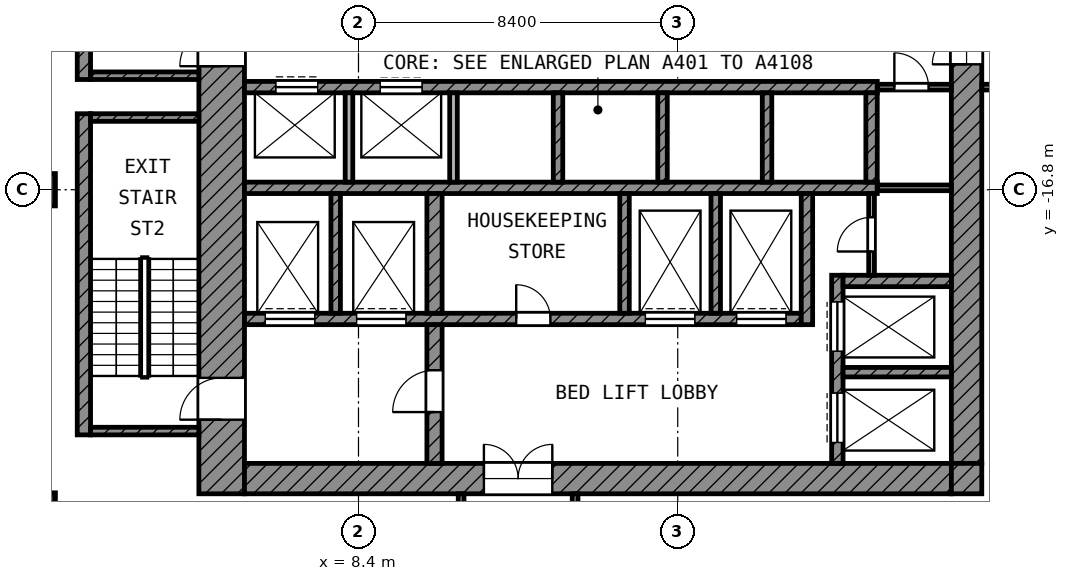
"""IFC4 building model, lengths in metres.
Left out: names, types, materials, properties, quantities, classifications, styles, units other than length and angle.
Written with IfcOpenShell. Run it as: python <this file> out.ifc"""

import sys

from ifc_helpers import new_model, si_unit, direction, frame, frame_2d, origin, origin_2d, place, context, subcontext, project, spatial, rectangle, extrude, element, fill, save


model = new_model("IFC4")
c1 = context("Model", 3, precision=1e-05, world=origin(), true_north=direction((0.0, 1.0)))
c2 = subcontext(c1, "Body", "Model", "MODEL_VIEW")
j1 = project(units=[si_unit("LENGTHUNIT", "METRE"), si_unit("PLANEANGLEUNIT", "RADIAN")], contexts=[c1])
p1 = place(None, origin())
s1 = spatial("IfcSite", under=j1, at=p1, CompositionType="ELEMENT")
p2 = place(p1, origin())
s2 = spatial("IfcBuilding", under=s1, at=p2, CompositionType="ELEMENT")
p3 = place(p2, frame((0.0, 0.0, 268.4)))
s3 = spatial("IfcBuildingStorey", under=s2, at=p3, CompositionType="ELEMENT", Elevation=268.4)
for number, where, z_axis, x_axis in (
    (1, (0.0, -16.8, 0.0), (0.0, 0.0, 1.0), (1.0, 0.0, 0.0)),
    (2, (0.0, -25.2, 0.0), (0.0, 0.0, 1.0), (1.0, 0.0, 0.0)),
):
    element("IfcColumn", number, at=place(p3, frame(where, z_axis=z_axis, x_axis=x_axis)), inside=s3, PredefinedType="COLUMN", context=c2, shape_type="SweptSolid", body=[
        extrude(rectangle(XDim=0.85, YDim=0.85, at=origin_2d()), origin(), (0.0, 0.0, 1.0), 4.2),
    ])
p4 = place(p3, frame((4.8, -24.8, 0.0), z_axis=(0.0, 0.0, 1.0), x_axis=(0.0, 1.0, 0.0)))
e3 = element("IfcWall", 3, at=p4, inside=s3, PredefinedType="SHEAR", context=c2, shape_type="SweptSolid", body=[
    extrude(rectangle(XDim=19.4, YDim=1.2, at=frame_2d((9.7, 0.0))), origin(), (0.0, 0.0, 1.0), 3.7),
])
p5 = place(p4, frame((11.25, 0.0, 0.0)))
e4 = element("IfcOpeningElement", 4, at=p5, cuts=e3, PredefinedType="OPENING", context=c2, shape_type="SweptSolid", body=[
    extrude(rectangle(XDim=1.1, YDim=2.1, at=frame_2d((0.55, 1.05))), frame((0.0, 0.61, 0.0), z_axis=(0.0, -1.0, 0.0), x_axis=(1.0, 0.0, 0.0)), (0.0, 0.0, 1.0), 1.22),
])
p6 = place(p4, frame((1.95, 0.0, 0.0)))
e5 = element("IfcOpeningElement", 5, at=p6, cuts=e3, PredefinedType="OPENING", context=c2, shape_type="SweptSolid", body=[
    extrude(rectangle(XDim=1.1, YDim=2.1, at=frame_2d((0.55, 1.05))), frame((0.0, 0.61, 0.0), z_axis=(0.0, -1.0, 0.0), x_axis=(1.0, 0.0, 0.0)), (0.0, 0.0, 1.0), 1.22),
])
p7 = place(p3, frame((24.4, -24.0, 0.0), z_axis=(0.0, 0.0, 1.0), x_axis=(0.0, 1.0, 0.0)))
e6 = element("IfcWall", 6, at=p7, inside=s3, PredefinedType="SHEAR", context=c2, shape_type="SweptSolid", body=[
    extrude(rectangle(XDim=18.6, YDim=0.8, at=frame_2d((9.3, 0.0))), origin(), (0.0, 0.0, 1.0), 3.7),
])
p8 = place(p7, frame((10.5, 0.0, 0.0)))
e7 = element("IfcOpeningElement", 7, at=p8, cuts=e6, PredefinedType="OPENING", context=c2, shape_type="SweptSolid", body=[
    extrude(rectangle(XDim=1.8, YDim=2.1, at=frame_2d((0.9, 1.05))), frame((0.0, 0.41, 0.0), z_axis=(0.0, -1.0, 0.0), x_axis=(1.0, 0.0, 0.0)), (0.0, 0.0, 1.0), 0.82),
])
p9 = place(p3, frame((5.4, -24.4, 0.0), z_axis=(0.0, 0.0, 1.0), x_axis=(1.0, 0.0, 0.0)))
e8 = element("IfcWall", 8, at=p9, inside=s3, PredefinedType="SHEAR", context=c2, shape_type="SweptSolid", body=[
    extrude(rectangle(XDim=18.6, YDim=0.8, at=frame_2d((9.3, 0.0))), origin(), (0.0, 0.0, 1.0), 3.7),
])
p10 = place(p9, frame((6.3, 0.0, 0.0)))
e9 = element("IfcOpeningElement", 9, at=p10, cuts=e8, PredefinedType="OPENING", context=c2, shape_type="SweptSolid", body=[
    extrude(rectangle(XDim=1.8, YDim=2.1, at=frame_2d((0.9, 1.05))), frame((0.0, 0.41, 0.0), z_axis=(0.0, -1.0, 0.0), x_axis=(1.0, 0.0, 0.0)), (0.0, 0.0, 1.0), 0.82),
])
p11 = place(p3, frame((24.4, -24.8, 0.0), z_axis=(0.0, 0.0, 1.0), x_axis=(0.0, 1.0, 0.0)))
e10 = element("IfcWall", 10, at=p11, inside=s3, PredefinedType="SHEAR", context=c2, shape_type="SweptSolid", body=[
    extrude(rectangle(XDim=0.8, YDim=0.8, at=frame_2d((0.4, 0.0))), origin(), (0.0, 0.0, 1.0), 3.7),
])
p12 = place(p3, frame((5.4, -14.1, 0.0), z_axis=(0.0, 0.0, 1.0), x_axis=(1.0, 0.0, 0.0)))
e11 = element("IfcWall", 11, at=p12, inside=s3, PredefinedType="SHEAR", context=c2, shape_type="SweptSolid", body=[
    extrude(rectangle(XDim=16.65, YDim=0.3, at=frame_2d((8.325, 0.0))), origin(), (0.0, 0.0, 1.0), 3.7),
])
p13 = place(p12, frame((0.825, 0.0, 0.0)))
e12 = element("IfcOpeningElement", 12, at=p13, cuts=e11, PredefinedType="OPENING", context=c2, shape_type="SweptSolid", body=[
    extrude(rectangle(XDim=1.1, YDim=2.1, at=frame_2d((0.55, 1.05))), frame((0.0, 0.16, 0.0), z_axis=(0.0, -1.0, 0.0), x_axis=(1.0, 0.0, 0.0)), (0.0, 0.0, 1.0), 0.32),
])
p14 = place(p12, frame((3.575, 0.0, 0.0)))
e13 = element("IfcOpeningElement", 13, at=p14, cuts=e11, PredefinedType="OPENING", context=c2, shape_type="SweptSolid", body=[
    extrude(rectangle(XDim=1.1, YDim=2.1, at=frame_2d((0.55, 1.05))), frame((0.0, 0.16, 0.0), z_axis=(0.0, -1.0, 0.0), x_axis=(1.0, 0.0, 0.0)), (0.0, 0.0, 1.0), 0.32),
])
p15 = place(p3, frame((5.4, -16.75, 0.0), z_axis=(0.0, 0.0, 1.0), x_axis=(1.0, 0.0, 0.0)))
e14 = element("IfcWall", 14, at=p15, inside=s3, PredefinedType="SHEAR", context=c2, shape_type="SweptSolid", body=[
    extrude(rectangle(XDim=16.65, YDim=0.3, at=frame_2d((8.325, 0.0))), origin(), (0.0, 0.0, 1.0), 3.7),
])
p16 = place(p3, frame((5.4, -20.2, 0.0), z_axis=(0.0, 0.0, 1.0), x_axis=(1.0, 0.0, 0.0)))
e15 = element("IfcWall", 15, at=p16, inside=s3, PredefinedType="SHEAR", context=c2, shape_type="SweptSolid", body=[
    extrude(rectangle(XDim=14.65, YDim=0.3, at=frame_2d((7.325, 0.0))), origin(), (0.0, 0.0, 1.0), 3.7),
])
p17 = place(p16, frame((10.55, 0.0, 0.0)))
e16 = element("IfcOpeningElement", 16, at=p17, cuts=e15, PredefinedType="OPENING", context=c2, shape_type="SweptSolid", body=[
    extrude(rectangle(XDim=1.3, YDim=2.1, at=frame_2d((0.65, 1.05))), frame((0.0, 0.16, 0.0), z_axis=(0.0, -1.0, 0.0), x_axis=(1.0, 0.0, 0.0)), (0.0, 0.0, 1.0), 0.32),
])
p18 = place(p16, frame((12.95, 0.0, 0.0)))
e17 = element("IfcOpeningElement", 17, at=p18, cuts=e15, PredefinedType="OPENING", context=c2, shape_type="SweptSolid", body=[
    extrude(rectangle(XDim=1.3, YDim=2.1, at=frame_2d((0.65, 1.05))), frame((0.0, 0.16, 0.0), z_axis=(0.0, -1.0, 0.0), x_axis=(1.0, 0.0, 0.0)), (0.0, 0.0, 1.0), 0.32),
])
p19 = place(p16, frame((0.55, 0.0, 0.0)))
e18 = element("IfcOpeningElement", 18, at=p19, cuts=e15, PredefinedType="OPENING", context=c2, shape_type="SweptSolid", body=[
    extrude(rectangle(XDim=1.3, YDim=2.1, at=frame_2d((0.65, 1.05))), frame((0.0, 0.16, 0.0), z_axis=(0.0, -1.0, 0.0), x_axis=(1.0, 0.0, 0.0)), (0.0, 0.0, 1.0), 0.32),
])
p20 = place(p16, frame((2.95, 0.0, 0.0)))
e19 = element("IfcOpeningElement", 19, at=p20, cuts=e15, PredefinedType="OPENING", context=c2, shape_type="SweptSolid", body=[
    extrude(rectangle(XDim=1.3, YDim=2.1, at=frame_2d((0.65, 1.05))), frame((0.0, 0.16, 0.0), z_axis=(0.0, -1.0, 0.0), x_axis=(1.0, 0.0, 0.0)), (0.0, 0.0, 1.0), 0.32),
])
p21 = place(p16, frame((7.15, 0.0, 0.0)))
e20 = element("IfcOpeningElement", 20, at=p21, cuts=e15, PredefinedType="OPENING", context=c2, shape_type="SweptSolid", body=[
    extrude(rectangle(XDim=0.9, YDim=2.1, at=frame_2d((0.45, 1.05))), frame((0.0, 0.16, 0.0), z_axis=(0.0, -1.0, 0.0), x_axis=(1.0, 0.0, 0.0)), (0.0, 0.0, 1.0), 0.32),
])
p22 = place(p3, frame((10.4, -24.0, 0.0), z_axis=(0.0, 0.0, 1.0), x_axis=(0.0, 1.0, 0.0)))
e21 = element("IfcWall", 21, at=p22, inside=s3, PredefinedType="SHEAR", context=c2, shape_type="SweptSolid", body=[
    extrude(rectangle(XDim=3.65, YDim=0.4, at=frame_2d((1.825, 0.0))), origin(), (0.0, 0.0, 1.0), 3.7),
])
p23 = place(p22, frame((1.35, 0.0, 0.0)))
e22 = element("IfcOpeningElement", 22, at=p23, cuts=e21, PredefinedType="OPENING", context=c2, shape_type="SweptSolid", body=[
    extrude(rectangle(XDim=1.1, YDim=2.1, at=frame_2d((0.55, 1.05))), frame((0.0, 0.21, 0.0), z_axis=(0.0, -1.0, 0.0), x_axis=(1.0, 0.0, 0.0)), (0.0, 0.0, 1.0), 0.42),
])
p24 = place(p3, frame((10.4, -20.05, 0.0), z_axis=(0.0, 0.0, 1.0), x_axis=(0.0, 1.0, 0.0)))
e23 = element("IfcWall", 23, at=p24, inside=s3, PredefinedType="SHEAR", context=c2, shape_type="SweptSolid", body=[
    extrude(rectangle(XDim=3.15, YDim=0.4, at=frame_2d((1.575, 0.0))), origin(), (0.0, 0.0, 1.0), 3.7),
])
p25 = place(p3, frame((20.2, -20.35, 0.0), z_axis=(0.0, 0.0, 1.0), x_axis=(0.0, 1.0, 0.0)))
e24 = element("IfcWall", 24, at=p25, inside=s3, PredefinedType="SHEAR", context=c2, shape_type="SweptSolid", body=[
    extrude(rectangle(XDim=3.45, YDim=0.3, at=frame_2d((1.725, 0.0))), origin(), (0.0, 0.0, 1.0), 3.7),
])
p26 = place(p3, frame((21.9, -16.6, 0.0), z_axis=(0.0, 0.0, 1.0), x_axis=(0.0, 1.0, 0.0)))
e25 = element("IfcWall", 25, at=p26, inside=s3, PredefinedType="SHEAR", context=c2, shape_type="SweptSolid", body=[
    extrude(rectangle(XDim=2.35, YDim=0.3, at=frame_2d((1.175, 0.0))), origin(), (0.0, 0.0, 1.0), 3.7),
])
p27 = place(p3, frame((21.15, -19.2, 0.0), z_axis=(0.0, 0.0, 1.0), x_axis=(1.0, 0.0, 0.0)))
e26 = element("IfcWall", 26, at=p27, inside=s3, PredefinedType="SHEAR", context=c2, shape_type="SweptSolid", body=[
    extrude(rectangle(XDim=2.85, YDim=0.3, at=frame_2d((1.425, 0.0))), origin(), (0.0, 0.0, 1.0), 3.7),
])
p28 = place(p3, frame((21.0, -24.0, 0.0), z_axis=(0.0, 0.0, 1.0), x_axis=(0.0, 1.0, 0.0)))
e27 = element("IfcWall", 27, at=p28, inside=s3, PredefinedType="SHEAR", context=c2, shape_type="SweptSolid", body=[
    extrude(rectangle(XDim=4.95, YDim=0.3, at=frame_2d((2.475, 0.0))), origin(), (0.0, 0.0, 1.0), 3.7),
])
p29 = place(p28, frame((2.95, 0.0, 0.0)))
e28 = element("IfcOpeningElement", 28, at=p29, cuts=e27, PredefinedType="OPENING", context=c2, shape_type="SweptSolid", body=[
    extrude(rectangle(XDim=1.3, YDim=2.1, at=frame_2d((0.65, 1.05))), frame((0.0, 0.16, 0.0), z_axis=(0.0, -1.0, 0.0), x_axis=(1.0, 0.0, 0.0)), (0.0, 0.0, 1.0), 0.32),
])
p30 = place(p28, frame((0.55, 0.0, 0.0)))
e29 = element("IfcOpeningElement", 29, at=p30, cuts=e27, PredefinedType="OPENING", context=c2, shape_type="SweptSolid", body=[
    extrude(rectangle(XDim=1.3, YDim=2.1, at=frame_2d((0.65, 1.05))), frame((0.0, 0.16, 0.0), z_axis=(0.0, -1.0, 0.0), x_axis=(1.0, 0.0, 0.0)), (0.0, 0.0, 1.0), 0.32),
])
p31 = place(p3, frame((21.15, -21.6, 0.0), z_axis=(0.0, 0.0, 1.0), x_axis=(1.0, 0.0, 0.0)))
e30 = element("IfcWall", 30, at=p31, inside=s3, PredefinedType="SHEAR", context=c2, shape_type="SweptSolid", body=[
    extrude(rectangle(XDim=2.85, YDim=0.25, at=frame_2d((1.425, 0.0))), origin(), (0.0, 0.0, 1.0), 3.7),
])
for number, where, z_axis, x_axis in (
    (31, (7.8, -20.05, 0.0), (0.0, 0.0, 1.0), (0.0, 1.0, 0.0)),
    (32, (15.4, -20.05, 0.0), (0.0, 0.0, 1.0), (0.0, 1.0, 0.0)),
    (33, (17.8, -20.05, 0.0), (0.0, 0.0, 1.0), (0.0, 1.0, 0.0)),
):
    element("IfcWall", number, at=place(p3, frame(where, z_axis=z_axis, x_axis=x_axis)), inside=s3, PredefinedType="SHEAR", context=c2, shape_type="SweptSolid", body=[
        extrude(rectangle(XDim=3.15, YDim=0.25, at=frame_2d((1.575, 0.0))), origin(), (0.0, 0.0, 1.0), 3.7),
    ])
for number, where, z_axis, x_axis in (
    (34, (8.15, -16.6, 0.0), (0.0, 0.0, 1.0), (0.0, 1.0, 0.0)),
    (35, (10.9, -16.6, 0.0), (0.0, 0.0, 1.0), (0.0, 1.0, 0.0)),
):
    element("IfcWall", number, at=place(p3, frame(where, z_axis=z_axis, x_axis=x_axis)), inside=s3, PredefinedType="PARTITIONING", context=c2, shape_type="SweptSolid", body=[
        extrude(rectangle(XDim=2.35, YDim=0.2, at=frame_2d((1.175, 0.0))), origin(), (0.0, 0.0, 1.0), 3.7),
    ])
for number, where, z_axis, x_axis in (
    (36, (13.65, -16.6, 0.0), (0.0, 0.0, 1.0), (0.0, 1.0, 0.0)),
    (37, (16.4, -16.6, 0.0), (0.0, 0.0, 1.0), (0.0, 1.0, 0.0)),
    (38, (19.15, -16.6, 0.0), (0.0, 0.0, 1.0), (0.0, 1.0, 0.0)),
):
    element("IfcWall", number, at=place(p3, frame(where, z_axis=z_axis, x_axis=x_axis)), inside=s3, PredefinedType="SHEAR", context=c2, shape_type="SweptSolid", body=[
        extrude(rectangle(XDim=2.35, YDim=0.25, at=frame_2d((1.175, 0.0))), origin(), (0.0, 0.0, 1.0), 3.7),
    ])
p32 = place(p3, frame((21.9, -19.05, 0.0), z_axis=(0.0, 0.0, 1.0), x_axis=(0.0, 1.0, 0.0)))
e39 = element("IfcWall", 39, at=p32, inside=s3, PredefinedType="PARTITIONING", context=c2, shape_type="SweptSolid", body=[
    extrude(rectangle(XDim=2.15, YDim=0.15, at=frame_2d((1.075, 0.0))), origin(), (0.0, 0.0, 1.0), 3.7),
])
p33 = place(p32, frame((0.625, 0.0, 0.0)))
e40 = element("IfcOpeningElement", 40, at=p33, cuts=e39, PredefinedType="OPENING", context=c2, shape_type="SweptSolid", body=[
    extrude(rectangle(XDim=0.9, YDim=2.1, at=frame_2d((0.45, 1.05))), frame((0.0, 0.085, 0.0), z_axis=(0.0, -1.0, 0.0), x_axis=(1.0, 0.0, 0.0)), (0.0, 0.0, 1.0), 0.17),
])
p34 = place(p3, frame((22.05, -16.75, 0.0), z_axis=(0.0, 0.0, 1.0), x_axis=(1.0, 0.0, 0.0)))
e41 = element("IfcWall", 41, at=p34, inside=s3, PredefinedType="PARTITIONING", context=c2, shape_type="SweptSolid", body=[
    extrude(rectangle(XDim=1.95, YDim=0.15, at=frame_2d((0.975, 0.0))), origin(), (0.0, 0.0, 1.0), 3.7),
])
p35 = place(p3, frame((22.05, -14.1, 0.0), z_axis=(0.0, 0.0, 1.0), x_axis=(1.0, 0.0, 0.0)))
e42 = element("IfcWall", 42, at=p35, inside=s3, PredefinedType="PARTITIONING", context=c2, shape_type="SweptSolid", body=[
    extrude(rectangle(XDim=1.95, YDim=0.15, at=frame_2d((0.975, 0.0))), origin(), (0.0, 0.0, 1.0), 3.7),
])
p36 = place(p35, frame((0.45, 0.0, 0.0)))
e43 = element("IfcOpeningElement", 43, at=p36, cuts=e42, PredefinedType="OPENING", context=c2, shape_type="SweptSolid", body=[
    extrude(rectangle(XDim=0.9, YDim=2.1, at=frame_2d((0.45, 1.05))), frame((0.0, 0.085, 0.0), z_axis=(0.0, -1.0, 0.0), x_axis=(1.0, 0.0, 0.0)), (0.0, 0.0, 1.0), 0.17),
])
p37 = place(p3, frame((1.175, -13.9, 0.0), z_axis=(0.0, 0.0, 1.0), x_axis=(0.0, 1.0, 0.0)))
e44 = element("IfcWall", 44, at=p37, inside=s3, PredefinedType="SHEAR", context=c2, shape_type="SweptSolid", body=[
    extrude(rectangle(XDim=8.45, YDim=0.35, at=frame_2d((4.225, 0.0))), origin(), (0.0, 0.0, 1.0), 3.7),
])
p38 = place(p3, frame((1.35, -13.8, 0.0), z_axis=(0.0, 0.0, 1.0), x_axis=(1.0, 0.0, 0.0)))
e45 = element("IfcWall", 45, at=p38, inside=s3, PredefinedType="SHEAR", context=c2, shape_type="SweptSolid", body=[
    extrude(rectangle(XDim=2.85, YDim=0.2, at=frame_2d((1.425, 0.0))), origin(), (0.0, 0.0, 1.0), 3.7),
])
p39 = place(p3, frame((1.175, -23.25, 0.0), z_axis=(0.0, 0.0, 1.0), x_axis=(0.0, 1.0, 0.0)))
e46 = element("IfcWall", 46, at=p39, inside=s3, PredefinedType="SHEAR", context=c2, shape_type="SweptSolid", body=[
    extrude(rectangle(XDim=8.45, YDim=0.35, at=frame_2d((4.225, 0.0))), origin(), (0.0, 0.0, 1.0), 3.7),
])
for number, where, z_axis, x_axis in (
    (47, (1.35, -14.9, 0.0), (0.0, 0.0, 1.0), (1.0, 0.0, 0.0)),
    (48, (1.35, -23.15, 0.0), (0.0, 0.0, 1.0), (1.0, 0.0, 0.0)),
):
    element("IfcWall", number, at=place(p3, frame(where, z_axis=z_axis, x_axis=x_axis)), inside=s3, PredefinedType="SHEAR", context=c2, shape_type="SweptSolid", body=[
        extrude(rectangle(XDim=2.85, YDim=0.2, at=frame_2d((1.425, 0.0))), origin(), (0.0, 0.0, 1.0), 3.7),
    ])
p40 = place(p3, frame((24.8, -14.1, 0.0), z_axis=(0.0, 0.0, 1.0), x_axis=(1.0, 0.0, 0.0)))
e49 = element("IfcWall", 49, at=p40, inside=s3, PredefinedType="PARTITIONING", context=c2, shape_type="SweptSolid", body=[
    extrude(rectangle(XDim=4.525, YDim=0.15, at=frame_2d((2.262, 0.0))), origin(), (0.0, 0.0, 1.0), 3.7),
])
p41 = place(p40, frame((1.75, 0.0, 0.0)))
e50 = element("IfcOpeningElement", 50, at=p41, cuts=e49, PredefinedType="OPENING", context=c2, shape_type="SweptSolid", body=[
    extrude(rectangle(XDim=1.5, YDim=2.1, at=frame_2d((0.75, 1.05))), frame((0.0, 0.085, 0.0), z_axis=(0.0, -1.0, 0.0), x_axis=(1.0, 0.0, 0.0)), (0.0, 0.0, 1.0), 0.17),
])
for number, where, z_axis, x_axis in (
    (51, (11.1, -29.4, 0.0), (0.0, 0.0, 1.0), (0.0, 1.0, 0.0)),
    (52, (14.1, -29.4, 0.0), (0.0, 0.0, 1.0), (0.0, 1.0, 0.0)),
):
    element("IfcWall", number, at=place(p3, frame(where, z_axis=z_axis, x_axis=x_axis)), inside=s3, PredefinedType="PARTITIONING", context=c2, shape_type="SweptSolid", body=[
        extrude(rectangle(XDim=4.6, YDim=0.15, at=frame_2d((2.3, 0.0))), origin(), (0.0, 0.0, 1.0), 3.7),
    ])
p42 = place(p13, origin())
e53 = element("IfcDoor", 53, at=p42, inside=s3, OperationType="DOUBLE_DOOR_SLIDING", PredefinedType="DOOR", context=c2, shape_type="SweptSolid", body=[
    extrude(rectangle(XDim=1.1, YDim=2.1, at=frame_2d((0.55, 1.05))), frame((0.0, 0.025, 0.0), z_axis=(0.0, -1.0, 0.0), x_axis=(1.0, 0.0, 0.0)), (0.0, 0.0, 1.0), 0.05),
])
fill(e12, e53)
p43 = place(p14, origin())
e54 = element("IfcDoor", 54, at=p43, inside=s3, OperationType="DOUBLE_DOOR_SLIDING", PredefinedType="DOOR", context=c2, shape_type="SweptSolid", body=[
    extrude(rectangle(XDim=1.1, YDim=2.1, at=frame_2d((0.55, 1.05))), frame((0.0, 0.025, 0.0), z_axis=(0.0, -1.0, 0.0), x_axis=(1.0, 0.0, 0.0)), (0.0, 0.0, 1.0), 0.05),
])
fill(e13, e54)
p44 = place(p29, origin())
e55 = element("IfcDoor", 55, at=p44, inside=s3, OperationType="DOUBLE_DOOR_SLIDING", PredefinedType="DOOR", context=c2, shape_type="SweptSolid", body=[
    extrude(rectangle(XDim=1.3, YDim=2.1, at=frame_2d((0.65, 1.05))), frame((0.0, 0.025, 0.0), z_axis=(0.0, -1.0, 0.0), x_axis=(1.0, 0.0, 0.0)), (0.0, 0.0, 1.0), 0.05),
])
fill(e28, e55)
p45 = place(p30, origin())
e56 = element("IfcDoor", 56, at=p45, inside=s3, OperationType="DOUBLE_DOOR_SLIDING", PredefinedType="DOOR", context=c2, shape_type="SweptSolid", body=[
    extrude(rectangle(XDim=1.3, YDim=2.1, at=frame_2d((0.65, 1.05))), frame((0.0, 0.025, 0.0), z_axis=(0.0, -1.0, 0.0), x_axis=(1.0, 0.0, 0.0)), (0.0, 0.0, 1.0), 0.05),
])
fill(e29, e56)
p46 = place(p17, origin())
e57 = element("IfcDoor", 57, at=p46, inside=s3, OperationType="DOUBLE_DOOR_SLIDING", PredefinedType="DOOR", context=c2, shape_type="SweptSolid", body=[
    extrude(rectangle(XDim=1.3, YDim=2.1, at=frame_2d((0.65, 1.05))), frame((0.0, 0.025, 0.0), z_axis=(0.0, -1.0, 0.0), x_axis=(1.0, 0.0, 0.0)), (0.0, 0.0, 1.0), 0.05),
])
fill(e16, e57)
p47 = place(p18, origin())
e58 = element("IfcDoor", 58, at=p47, inside=s3, OperationType="DOUBLE_DOOR_SLIDING", PredefinedType="DOOR", context=c2, shape_type="SweptSolid", body=[
    extrude(rectangle(XDim=1.3, YDim=2.1, at=frame_2d((0.65, 1.05))), frame((0.0, 0.025, 0.0), z_axis=(0.0, -1.0, 0.0), x_axis=(1.0, 0.0, 0.0)), (0.0, 0.0, 1.0), 0.05),
])
fill(e17, e58)
p48 = place(p19, origin())
e59 = element("IfcDoor", 59, at=p48, inside=s3, OperationType="DOUBLE_DOOR_SLIDING", PredefinedType="DOOR", context=c2, shape_type="SweptSolid", body=[
    extrude(rectangle(XDim=1.3, YDim=2.1, at=frame_2d((0.65, 1.05))), frame((0.0, 0.025, 0.0), z_axis=(0.0, -1.0, 0.0), x_axis=(1.0, 0.0, 0.0)), (0.0, 0.0, 1.0), 0.05),
])
fill(e18, e59)
p49 = place(p20, origin())
e60 = element("IfcDoor", 60, at=p49, inside=s3, OperationType="DOUBLE_DOOR_SLIDING", PredefinedType="DOOR", context=c2, shape_type="SweptSolid", body=[
    extrude(rectangle(XDim=1.3, YDim=2.1, at=frame_2d((0.65, 1.05))), frame((0.0, 0.025, 0.0), z_axis=(0.0, -1.0, 0.0), x_axis=(1.0, 0.0, 0.0)), (0.0, 0.0, 1.0), 0.05),
])
fill(e19, e60)
p50 = place(p5, origin())
e61 = element("IfcDoor", 61, at=p50, inside=s3, OperationType="SINGLE_SWING_LEFT", PredefinedType="DOOR", context=c2, shape_type="SweptSolid", body=[
    extrude(rectangle(XDim=1.1, YDim=2.1, at=frame_2d((0.55, 1.05))), frame((0.0, 0.025, 0.0), z_axis=(0.0, -1.0, 0.0), x_axis=(1.0, 0.0, 0.0)), (0.0, 0.0, 1.0), 0.05),
])
fill(e4, e61)
p51 = place(p6, origin())
e62 = element("IfcDoor", 62, at=p51, inside=s3, OperationType="SINGLE_SWING_LEFT", PredefinedType="DOOR", context=c2, shape_type="SweptSolid", body=[
    extrude(rectangle(XDim=1.1, YDim=2.1, at=frame_2d((0.55, 1.05))), frame((0.0, 0.025, 0.0), z_axis=(0.0, -1.0, 0.0), x_axis=(1.0, 0.0, 0.0)), (0.0, 0.0, 1.0), 0.05),
])
fill(e5, e62)
p52 = place(p23, origin())
e63 = element("IfcDoor", 63, at=p52, inside=s3, OperationType="SINGLE_SWING_LEFT", PredefinedType="DOOR", context=c2, shape_type="SweptSolid", body=[
    extrude(rectangle(XDim=1.1, YDim=2.1, at=frame_2d((0.55, 1.05))), frame((0.0, 0.025, 0.0), z_axis=(0.0, -1.0, 0.0), x_axis=(1.0, 0.0, 0.0)), (0.0, 0.0, 1.0), 0.05),
])
fill(e22, e63)
p53 = place(p8, origin())
e64 = element("IfcDoor", 64, at=p53, inside=s3, OperationType="DOUBLE_DOOR_SINGLE_SWING", PredefinedType="DOOR", context=c2, shape_type="SweptSolid", body=[
    extrude(rectangle(XDim=1.8, YDim=2.1, at=frame_2d((0.9, 1.05))), frame((0.0, 0.025, 0.0), z_axis=(0.0, -1.0, 0.0), x_axis=(1.0, 0.0, 0.0)), (0.0, 0.0, 1.0), 0.05),
])
fill(e7, e64)
p54 = place(p10, origin())
e65 = element("IfcDoor", 65, at=p54, inside=s3, OperationType="DOUBLE_DOOR_SINGLE_SWING", PredefinedType="DOOR", context=c2, shape_type="SweptSolid", body=[
    extrude(rectangle(XDim=1.8, YDim=2.1, at=frame_2d((0.9, 1.05))), frame((0.0, 0.025, 0.0), z_axis=(0.0, -1.0, 0.0), x_axis=(1.0, 0.0, 0.0)), (0.0, 0.0, 1.0), 0.05),
])
fill(e9, e65)
p55 = place(p36, origin())
e66 = element("IfcDoor", 66, at=p55, inside=s3, OperationType="SINGLE_SWING_LEFT", PredefinedType="DOOR", context=c2, shape_type="SweptSolid", body=[
    extrude(rectangle(XDim=0.9, YDim=2.1, at=frame_2d((0.45, 1.05))), frame((0.0, 0.025, 0.0), z_axis=(0.0, -1.0, 0.0), x_axis=(1.0, 0.0, 0.0)), (0.0, 0.0, 1.0), 0.05),
])
fill(e43, e66)
p56 = place(p33, origin())
e67 = element("IfcDoor", 67, at=p56, inside=s3, OperationType="SINGLE_SWING_LEFT", PredefinedType="DOOR", context=c2, shape_type="SweptSolid", body=[
    extrude(rectangle(XDim=0.9, YDim=2.1, at=frame_2d((0.45, 1.05))), frame((0.0, 0.025, 0.0), z_axis=(0.0, -1.0, 0.0), x_axis=(1.0, 0.0, 0.0)), (0.0, 0.0, 1.0), 0.05),
])
fill(e40, e67)
p57 = place(p21, origin())
e68 = element("IfcDoor", 68, at=p57, inside=s3, OperationType="SINGLE_SWING_LEFT", PredefinedType="DOOR", context=c2, shape_type="SweptSolid", body=[
    extrude(rectangle(XDim=0.9, YDim=2.1, at=frame_2d((0.45, 1.05))), frame((0.0, 0.025, 0.0), z_axis=(0.0, -1.0, 0.0), x_axis=(1.0, 0.0, 0.0)), (0.0, 0.0, 1.0), 0.05),
])
fill(e20, e68)
save(model, sys.argv[1])
